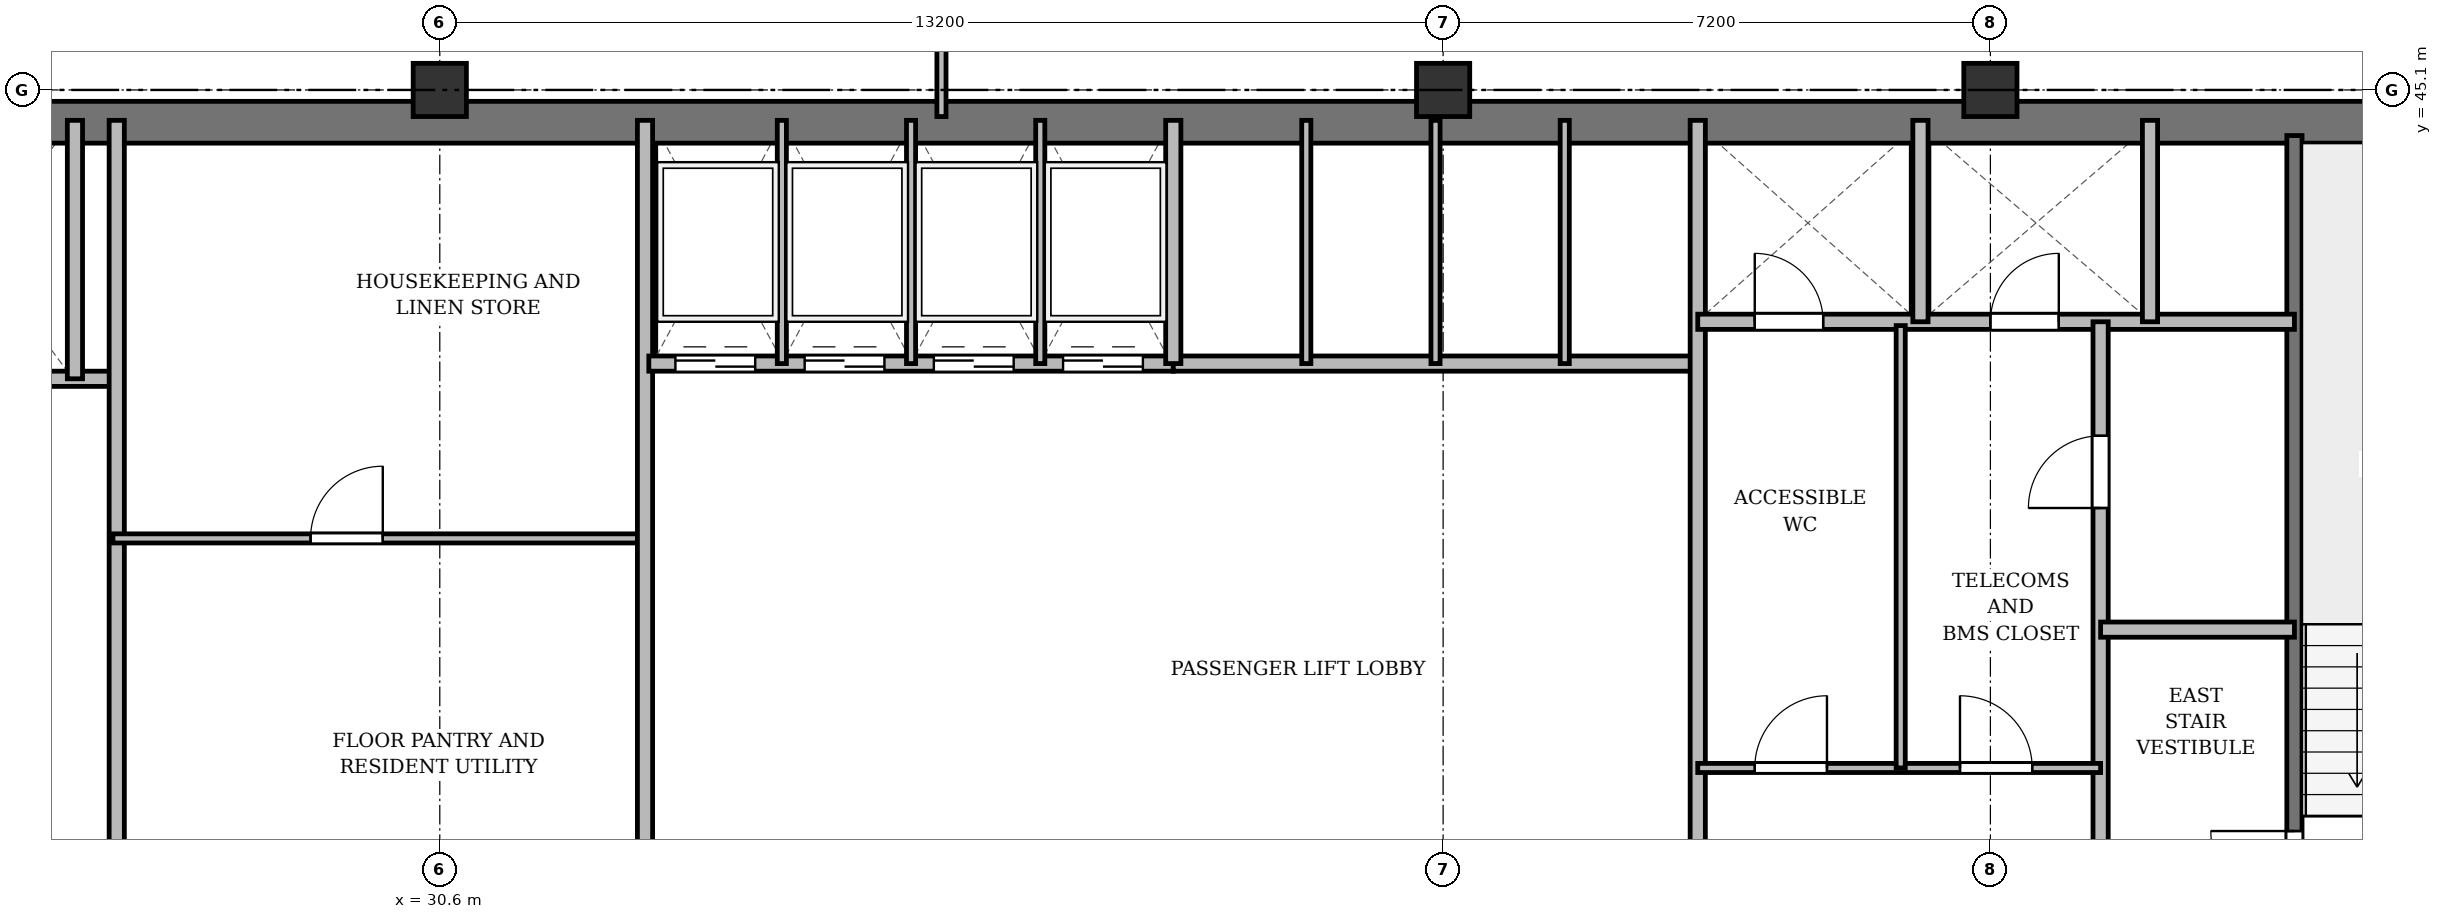
"""IFC4 building model, lengths in metres.
Left out: names, types, materials, properties, quantities, classifications, styles, units other than length and angle.
Written with IfcOpenShell. Run it as: python <this file> out.ifc"""

import sys

from ifc_helpers import new_model, si_unit, direction, frame, frame_2d, origin, origin_2d, place, context, subcontext, project, spatial, rectangle, extrude, source, transform, mapped, element, fill, save


model = new_model("IFC4")
c1 = context("Model", 3, precision=1e-05, world=origin(), true_north=direction((0.0, 1.0)))
c2 = subcontext(c1, "Body", "Model", "MODEL_VIEW")
j1 = project(units=[si_unit("LENGTHUNIT", "METRE"), si_unit("PLANEANGLEUNIT", "RADIAN")], contexts=[c1])
p1 = place(None, origin())
s1 = spatial("IfcSite", under=j1, at=p1, CompositionType="ELEMENT")
p2 = place(p1, origin())
s2 = spatial("IfcBuilding", under=s1, at=p2, CompositionType="ELEMENT")
p3 = place(p2, frame((0.0, 0.0, 142.9)))
s3 = spatial("IfcBuildingStorey", under=s2, at=p3, CompositionType="ELEMENT", Elevation=142.9)
m1 = source(origin(), c2, "Body", "SweptSolid", [
    extrude(rectangle(XDim=0.7, YDim=0.7, at=origin_2d()), origin(), (0.0, 0.0, 1.0), 3.6),
])
for number, where, z_axis, x_axis in (
    (1, (30.6, 45.1, 0.0), (0.0, 0.0, 1.0), (1.0, 0.0, 0.0)),
    (2, (43.8, 45.1, 0.0), (0.0, 0.0, 1.0), (1.0, 0.0, 0.0)),
    (3, (51.0, 45.1, 0.0), (0.0, 0.0, 1.0), (1.0, 0.0, 0.0)),
):
    element("IfcColumn", number, at=place(p3, frame(where, z_axis=z_axis, x_axis=x_axis)), inside=s3, PredefinedType="COLUMN", context=c2, shape_type="MappedRepresentation", body=[
        mapped(m1, transform((0.0, 0.0, 0.0), x_axis=(1.0, 0.0, 0.0), y_axis=(0.0, 1.0, 0.0), z_axis=(0.0, 0.0, 1.0), scale=1.0)),
    ])
p4 = place(p3, frame((15.65, 44.675, 0.0), z_axis=(0.0, 0.0, 1.0), x_axis=(1.0, 0.0, 0.0)))
e4 = element("IfcWall", 4, at=p4, inside=s3, PredefinedType="SHEAR", context=c2, shape_type="SweptSolid", body=[
    extrude(rectangle(XDim=43.1, YDim=0.55, at=frame_2d((21.55, 0.0))), origin(), (0.0, 0.0, 1.0), 3.35),
])
p5 = place(p3, frame((55.0, 33.4, 0.0), z_axis=(0.0, 0.0, 1.0), x_axis=(0.0, 1.0, 0.0)))
e5 = element("IfcWall", 5, at=p5, inside=s3, PredefinedType="SHEAR", context=c2, shape_type="SweptSolid", body=[
    extrude(rectangle(XDim=11.1, YDim=0.2, at=frame_2d((5.55, 0.0))), origin(), (0.0, 0.0, 1.0), 3.35),
])
p6 = place(p5, frame((0.85, 0.0, 0.0)))
e6 = element("IfcOpeningElement", 6, at=p6, cuts=e5, PredefinedType="OPENING", context=c2, shape_type="SweptSolid", body=[
    extrude(rectangle(XDim=1.1, YDim=2.15, at=frame_2d((0.55, 1.075))), frame((0.0, 0.11, 0.0), z_axis=(0.0, -1.0, 0.0), x_axis=(1.0, 0.0, 0.0)), (0.0, 0.0, 1.0), 0.22),
])
p7 = place(p3, frame((19.55, 41.3, 0.0), z_axis=(0.0, 0.0, 1.0), x_axis=(1.0, 0.0, 0.0)))
e7 = element("IfcWall", 7, at=p7, inside=s3, PredefinedType="SOLIDWALL", context=c2, shape_type="SweptSolid", body=[
    extrude(rectangle(XDim=6.75, YDim=0.2, at=frame_2d((3.375, 0.0))), origin(), (0.0, 0.0, 1.0), 3.35),
])
p8 = place(p7, frame((1.7, 0.0, 0.0)))
e8 = element("IfcOpeningElement", 8, at=p8, cuts=e7, PredefinedType="OPENING", context=c2, shape_type="SweptSolid", body=[
    extrude(rectangle(XDim=1.1, YDim=2.15, at=frame_2d((0.55, 1.075))), frame((0.0, 0.11, 0.0), z_axis=(0.0, -1.0, 0.0), x_axis=(1.0, 0.0, 0.0)), (0.0, 0.0, 1.0), 0.22),
])
p9 = place(p7, frame((4.4, 0.0, 0.0)))
e9 = element("IfcOpeningElement", 9, at=p9, cuts=e7, PredefinedType="OPENING", context=c2, shape_type="SweptSolid", body=[
    extrude(rectangle(XDim=1.1, YDim=2.15, at=frame_2d((0.55, 1.075))), frame((0.0, 0.11, 0.0), z_axis=(0.0, -1.0, 0.0), x_axis=(1.0, 0.0, 0.0)), (0.0, 0.0, 1.0), 0.22),
])
p10 = place(p3, frame((25.8, 41.3, 0.0), z_axis=(0.0, 0.0, 1.0), x_axis=(0.0, 1.0, 0.0)))
e10 = element("IfcWall", 10, at=p10, inside=s3, PredefinedType="SOLIDWALL", context=c2, shape_type="SweptSolid", body=[
    extrude(rectangle(XDim=3.4, YDim=0.2, at=frame_2d((1.7, 0.0))), origin(), (0.0, 0.0, 1.0), 3.35),
])
p11 = place(p3, frame((26.35, 33.4, 0.0), z_axis=(0.0, 0.0, 1.0), x_axis=(0.0, 1.0, 0.0)))
e11 = element("IfcWall", 11, at=p11, inside=s3, PredefinedType="SOLIDWALL", context=c2, shape_type="SweptSolid", body=[
    extrude(rectangle(XDim=11.3, YDim=0.2, at=frame_2d((5.65, 0.0))), origin(), (0.0, 0.0, 1.0), 2.75),
])
p12 = place(p3, frame((26.3, 39.2, 0.0), z_axis=(0.0, 0.0, 1.0), x_axis=(1.0, 0.0, 0.0)))
e12 = element("IfcWall", 12, at=p12, inside=s3, PredefinedType="PARTITIONING", context=c2, shape_type="SweptSolid", body=[
    extrude(rectangle(XDim=7.0, YDim=0.12, at=frame_2d((3.5, 0.0))), origin(), (0.0, 0.0, 1.0), 2.85),
])
p13 = place(p12, frame((2.6, 0.0, 0.0)))
e13 = element("IfcOpeningElement", 13, at=p13, cuts=e12, PredefinedType="OPENING", context=c2, shape_type="SweptSolid", body=[
    extrude(rectangle(XDim=0.95, YDim=2.15, at=frame_2d((0.475, 1.075))), frame((0.0, 0.07, 0.0), z_axis=(0.0, -1.0, 0.0), x_axis=(1.0, 0.0, 0.0)), (0.0, 0.0, 1.0), 0.14),
])
p14 = place(p3, frame((33.3, 33.4, 0.0), z_axis=(0.0, 0.0, 1.0), x_axis=(0.0, 1.0, 0.0)))
e14 = element("IfcWall", 14, at=p14, inside=s3, PredefinedType="SOLIDWALL", context=c2, shape_type="SweptSolid", body=[
    extrude(rectangle(XDim=11.3, YDim=0.2, at=frame_2d((5.65, 0.0))), origin(), (0.0, 0.0, 1.0), 2.75),
])
p15 = place(p3, frame((33.35, 41.5, 0.0), z_axis=(0.0, 0.0, 1.0), x_axis=(1.0, 0.0, 0.0)))
e15 = element("IfcWall", 15, at=p15, inside=s3, PredefinedType="SOLIDWALL", context=c2, shape_type="SweptSolid", body=[
    extrude(rectangle(XDim=6.9, YDim=0.2, at=frame_2d((3.45, 0.0))), origin(), (0.0, 0.0, 1.0), 3.35),
])
p16 = place(p15, frame((0.35, 0.0, 0.0)))
e16 = element("IfcOpeningElement", 16, at=p16, cuts=e15, PredefinedType="OPENING", context=c2, shape_type="SweptSolid", body=[
    extrude(rectangle(XDim=1.05, YDim=2.15, at=frame_2d((0.525, 1.075))), frame((0.0, 0.11, 0.0), z_axis=(0.0, -1.0, 0.0), x_axis=(1.0, 0.0, 0.0)), (0.0, 0.0, 1.0), 0.22),
])
p17 = place(p15, frame((2.05, 0.0, 0.0)))
e17 = element("IfcOpeningElement", 17, at=p17, cuts=e15, PredefinedType="OPENING", context=c2, shape_type="SweptSolid", body=[
    extrude(rectangle(XDim=1.05, YDim=2.15, at=frame_2d((0.525, 1.075))), frame((0.0, 0.11, 0.0), z_axis=(0.0, -1.0, 0.0), x_axis=(1.0, 0.0, 0.0)), (0.0, 0.0, 1.0), 0.22),
])
p18 = place(p15, frame((3.75, 0.0, 0.0)))
e18 = element("IfcOpeningElement", 18, at=p18, cuts=e15, PredefinedType="OPENING", context=c2, shape_type="SweptSolid", body=[
    extrude(rectangle(XDim=1.05, YDim=2.15, at=frame_2d((0.525, 1.075))), frame((0.0, 0.11, 0.0), z_axis=(0.0, -1.0, 0.0), x_axis=(1.0, 0.0, 0.0)), (0.0, 0.0, 1.0), 0.22),
])
p19 = place(p15, frame((5.45, 0.0, 0.0)))
e19 = element("IfcOpeningElement", 19, at=p19, cuts=e15, PredefinedType="OPENING", context=c2, shape_type="SweptSolid", body=[
    extrude(rectangle(XDim=1.05, YDim=2.15, at=frame_2d((0.525, 1.075))), frame((0.0, 0.11, 0.0), z_axis=(0.0, -1.0, 0.0), x_axis=(1.0, 0.0, 0.0)), (0.0, 0.0, 1.0), 0.22),
])
for number, where, z_axis, x_axis in (
    (20, (35.1, 41.5, 0.0), (0.0, 0.0, 1.0), (0.0, 1.0, 0.0)),
    (21, (36.8, 41.5, 0.0), (0.0, 0.0, 1.0), (0.0, 1.0, 0.0)),
    (22, (38.5, 41.5, 0.0), (0.0, 0.0, 1.0), (0.0, 1.0, 0.0)),
):
    element("IfcWall", number, at=place(p3, frame(where, z_axis=z_axis, x_axis=x_axis)), inside=s3, PredefinedType="PARTITIONING", context=c2, shape_type="SweptSolid", body=[
        extrude(rectangle(XDim=3.2, YDim=0.12, at=frame_2d((1.6, 0.0))), origin(), (0.0, 0.0, 1.0), 3.35),
    ])
p20 = place(p3, frame((40.25, 41.5, 0.0), z_axis=(0.0, 0.0, 1.0), x_axis=(1.0, 0.0, 0.0)))
e23 = element("IfcWall", 23, at=p20, inside=s3, PredefinedType="SOLIDWALL", context=c2, shape_type="SweptSolid", body=[
    extrude(rectangle(XDim=6.9, YDim=0.2, at=frame_2d((3.45, 0.0))), origin(), (0.0, 0.0, 1.0), 2.85),
])
p21 = place(p3, frame((40.25, 41.5, 0.0), z_axis=(0.0, 0.0, 1.0), x_axis=(0.0, 1.0, 0.0)))
e24 = element("IfcWall", 24, at=p21, inside=s3, PredefinedType="SOLIDWALL", context=c2, shape_type="SweptSolid", body=[
    extrude(rectangle(XDim=3.2, YDim=0.2, at=frame_2d((1.6, 0.0))), origin(), (0.0, 0.0, 1.0), 3.35),
])
p22 = place(p3, frame((42.0, 41.5, 0.0), z_axis=(0.0, 0.0, 1.0), x_axis=(0.0, 1.0, 0.0)))
e25 = element("IfcWall", 25, at=p22, inside=s3, PredefinedType="PARTITIONING", context=c2, shape_type="SweptSolid", body=[
    extrude(rectangle(XDim=3.2, YDim=0.12, at=frame_2d((1.6, 0.0))), origin(), (0.0, 0.0, 1.0), 3.35),
])
p23 = place(p3, frame((43.7, 41.5, 0.0), z_axis=(0.0, 0.0, 1.0), x_axis=(0.0, 1.0, 0.0)))
e26 = element("IfcWall", 26, at=p23, inside=s3, PredefinedType="PARTITIONING", context=c2, shape_type="SweptSolid", body=[
    extrude(rectangle(XDim=3.2, YDim=0.12, at=frame_2d((1.6, 0.0))), origin(), (0.0, 0.0, 1.0), 2.85),
])
p24 = place(p3, frame((45.4, 41.5, 0.0), z_axis=(0.0, 0.0, 1.0), x_axis=(0.0, 1.0, 0.0)))
e27 = element("IfcWall", 27, at=p24, inside=s3, PredefinedType="PARTITIONING", context=c2, shape_type="SweptSolid", body=[
    extrude(rectangle(XDim=3.2, YDim=0.12, at=frame_2d((1.6, 0.0))), origin(), (0.0, 0.0, 1.0), 3.35),
])
p25 = place(p3, frame((47.15, 33.4, 0.0), z_axis=(0.0, 0.0, 1.0), x_axis=(0.0, 1.0, 0.0)))
e28 = element("IfcWall", 28, at=p25, inside=s3, PredefinedType="SOLIDWALL", context=c2, shape_type="SweptSolid", body=[
    extrude(rectangle(XDim=11.3, YDim=0.2, at=frame_2d((5.65, 0.0))), origin(), (0.0, 0.0, 1.0), 2.75),
])
p26 = place(p3, frame((47.15, 42.05, 0.0), z_axis=(0.0, 0.0, 1.0), x_axis=(1.0, 0.0, 0.0)))
e29 = element("IfcWall", 29, at=p26, inside=s3, PredefinedType="SOLIDWALL", context=c2, shape_type="SweptSolid", body=[
    extrude(rectangle(XDim=7.85, YDim=0.2, at=frame_2d((3.925, 0.0))), origin(), (0.0, 0.0, 1.0), 2.85),
])
p27 = place(p26, frame((0.75, 0.0, 0.0)))
e30 = element("IfcOpeningElement", 30, at=p27, cuts=e29, PredefinedType="OPENING", context=c2, shape_type="SweptSolid", body=[
    extrude(rectangle(XDim=0.9, YDim=2.1, at=frame_2d((0.45, 1.05))), frame((0.0, 0.11, 0.0), z_axis=(0.0, -1.0, 0.0), x_axis=(1.0, 0.0, 0.0)), (0.0, 0.0, 1.0), 0.22),
])
p28 = place(p26, frame((3.85, 0.0, 0.0)))
e31 = element("IfcOpeningElement", 31, at=p28, cuts=e29, PredefinedType="OPENING", context=c2, shape_type="SweptSolid", body=[
    extrude(rectangle(XDim=0.9, YDim=2.1, at=frame_2d((0.45, 1.05))), frame((0.0, 0.11, 0.0), z_axis=(0.0, -1.0, 0.0), x_axis=(1.0, 0.0, 0.0)), (0.0, 0.0, 1.0), 0.22),
])
for number, where, z_axis, x_axis in (
    (32, (50.08, 42.05, 0.0), (0.0, 0.0, 1.0), (0.0, 1.0, 0.0)),
    (33, (53.1, 42.05, 0.0), (0.0, 0.0, 1.0), (0.0, 1.0, 0.0)),
):
    element("IfcWall", number, at=place(p3, frame(where, z_axis=z_axis, x_axis=x_axis)), inside=s3, PredefinedType="SOLIDWALL", context=c2, shape_type="SweptSolid", body=[
        extrude(rectangle(XDim=2.65, YDim=0.2, at=frame_2d((1.325, 0.0))), origin(), (0.0, 0.0, 1.0), 3.35),
    ])
p29 = place(p3, frame((52.45, 33.4, 0.0), z_axis=(0.0, 0.0, 1.0), x_axis=(0.0, 1.0, 0.0)))
e34 = element("IfcWall", 34, at=p29, inside=s3, PredefinedType="PARTITIONING", context=c2, shape_type="SweptSolid", body=[
    extrude(rectangle(XDim=8.65, YDim=0.2, at=frame_2d((4.325, 0.0))), origin(), (0.0, 0.0, 1.0), 2.75),
])
p30 = place(p29, frame((6.2, 0.0, 0.0)))
e35 = element("IfcOpeningElement", 35, at=p30, cuts=e34, PredefinedType="OPENING", context=c2, shape_type="SweptSolid", body=[
    extrude(rectangle(XDim=0.95, YDim=2.15, at=frame_2d((0.475, 1.075))), frame((0.0, 0.11, 0.0), z_axis=(0.0, -1.0, 0.0), x_axis=(1.0, 0.0, 0.0)), (0.0, 0.0, 1.0), 0.22),
])
p31 = place(p3, frame((52.45, 38.0, 0.0), z_axis=(0.0, 0.0, 1.0), x_axis=(1.0, 0.0, 0.0)))
e36 = element("IfcWall", 36, at=p31, inside=s3, PredefinedType="PARTITIONING", context=c2, shape_type="SweptSolid", body=[
    extrude(rectangle(XDim=2.55, YDim=0.2, at=frame_2d((1.275, 0.0))), origin(), (0.0, 0.0, 1.0), 3.35),
])
p32 = place(p3, frame((47.15, 36.18, 0.0), z_axis=(0.0, 0.0, 1.0), x_axis=(1.0, 0.0, 0.0)))
e37 = element("IfcWall", 37, at=p32, inside=s3, PredefinedType="PARTITIONING", context=c2, shape_type="SweptSolid", body=[
    extrude(rectangle(XDim=5.3, YDim=0.12, at=frame_2d((2.65, 0.0))), origin(), (0.0, 0.0, 1.0), 2.85),
])
p33 = place(p32, frame((0.75, 0.0, 0.0)))
e38 = element("IfcOpeningElement", 38, at=p33, cuts=e37, PredefinedType="OPENING", context=c2, shape_type="SweptSolid", body=[
    extrude(rectangle(XDim=0.95, YDim=2.15, at=frame_2d((0.475, 1.075))), frame((0.0, 0.07, 0.0), z_axis=(0.0, -1.0, 0.0), x_axis=(1.0, 0.0, 0.0)), (0.0, 0.0, 1.0), 0.14),
])
p34 = place(p32, frame((3.45, 0.0, 0.0)))
e39 = element("IfcOpeningElement", 39, at=p34, cuts=e37, PredefinedType="OPENING", context=c2, shape_type="SweptSolid", body=[
    extrude(rectangle(XDim=0.95, YDim=2.15, at=frame_2d((0.475, 1.075))), frame((0.0, 0.07, 0.0), z_axis=(0.0, -1.0, 0.0), x_axis=(1.0, 0.0, 0.0)), (0.0, 0.0, 1.0), 0.14),
])
p35 = place(p3, frame((49.82, 36.18, 0.0), z_axis=(0.0, 0.0, 1.0), x_axis=(0.0, 1.0, 0.0)))
e40 = element("IfcWall", 40, at=p35, inside=s3, PredefinedType="PARTITIONING", context=c2, shape_type="SweptSolid", body=[
    extrude(rectangle(XDim=5.82, YDim=0.12, at=frame_2d((2.91, 0.0))), origin(), (0.0, 0.0, 1.0), 3.35),
])
p36 = place(p3, frame((37.2, 44.75, 0.0), z_axis=(0.0, 0.0, 1.0), x_axis=(0.0, 1.0, 0.0)))
e41 = element("IfcWall", 41, at=p36, inside=s3, PredefinedType="PARTITIONING", context=c2, shape_type="SweptSolid", body=[
    extrude(rectangle(XDim=3.61, YDim=0.12, at=frame_2d((1.805, 0.0))), origin(), (0.0, 0.0, 1.0), 2.75),
])
p37 = place(p36, frame((1.1, 0.0, 0.0)))
e42 = element("IfcOpeningElement", 42, at=p37, cuts=e41, PredefinedType="OPENING", context=c2, shape_type="SweptSolid", body=[
    extrude(rectangle(XDim=0.95, YDim=2.15, at=frame_2d((0.475, 1.075))), frame((0.0, 0.07, 0.0), z_axis=(0.0, -1.0, 0.0), x_axis=(1.0, 0.0, 0.0)), (0.0, 0.0, 1.0), 0.14),
])
m2 = source(origin(), c2, "Body", "SweptSolid", [
    extrude(rectangle(XDim=1.1, YDim=2.15, at=frame_2d((0.55, 1.075))), frame((0.0, 0.025, 0.0), z_axis=(0.0, -1.0, 0.0), x_axis=(1.0, 0.0, 0.0)), (0.0, 0.0, 1.0), 0.05),
])
p38 = place(p6, origin())
e43 = element("IfcDoor", 43, at=p38, inside=s3, OperationType="SINGLE_SWING_RIGHT", PredefinedType="DOOR", context=c2, shape_type="MappedRepresentation", body=[
    mapped(m2, transform((0.0, 0.0, 0.0), x_axis=(1.0, 0.0, 0.0), y_axis=(0.0, 1.0, 0.0), z_axis=(0.0, 0.0, 1.0), scale=1.0)),
])
fill(e6, e43)
m3 = source(origin(), c2, "Body", "SweptSolid", [
    extrude(rectangle(XDim=0.95, YDim=2.15, at=frame_2d((0.475, 1.075))), frame((0.0, 0.025, 0.0), z_axis=(0.0, -1.0, 0.0), x_axis=(1.0, 0.0, 0.0)), (0.0, 0.0, 1.0), 0.05),
])
p39 = place(p13, origin())
e44 = element("IfcDoor", 44, at=p39, inside=s3, OperationType="SINGLE_SWING_RIGHT", PredefinedType="DOOR", context=c2, shape_type="MappedRepresentation", body=[
    mapped(m3, transform((0.0, 0.0, 0.0), x_axis=(1.0, 0.0, 0.0), y_axis=(0.0, 1.0, 0.0), z_axis=(0.0, 0.0, 1.0), scale=1.0)),
])
fill(e13, e44)
m4 = source(origin(), c2, "Body", "SweptSolid", [
    extrude(rectangle(XDim=1.05, YDim=2.15, at=frame_2d((0.525, 1.075))), frame((0.0, 0.025, 0.0), z_axis=(0.0, -1.0, 0.0), x_axis=(1.0, 0.0, 0.0)), (0.0, 0.0, 1.0), 0.05),
])
p40 = place(p16, origin())
e45 = element("IfcDoor", 45, at=p40, inside=s3, OperationType="DOUBLE_DOOR_SLIDING", PredefinedType="DOOR", context=c2, shape_type="MappedRepresentation", body=[
    mapped(m4, transform((0.0, 0.0, 0.0), x_axis=(1.0, 0.0, 0.0), y_axis=(0.0, 1.0, 0.0), z_axis=(0.0, 0.0, 1.0), scale=1.0)),
])
fill(e16, e45)
p41 = place(p17, origin())
e46 = element("IfcDoor", 46, at=p41, inside=s3, OperationType="DOUBLE_DOOR_SLIDING", PredefinedType="DOOR", context=c2, shape_type="MappedRepresentation", body=[
    mapped(m4, transform((0.0, 0.0, 0.0), x_axis=(1.0, 0.0, 0.0), y_axis=(0.0, 1.0, 0.0), z_axis=(0.0, 0.0, 1.0), scale=1.0)),
])
fill(e17, e46)
p42 = place(p18, origin())
e47 = element("IfcDoor", 47, at=p42, inside=s3, OperationType="DOUBLE_DOOR_SLIDING", PredefinedType="DOOR", context=c2, shape_type="MappedRepresentation", body=[
    mapped(m4, transform((0.0, 0.0, 0.0), x_axis=(1.0, 0.0, 0.0), y_axis=(0.0, 1.0, 0.0), z_axis=(0.0, 0.0, 1.0), scale=1.0)),
])
fill(e18, e47)
p43 = place(p19, origin())
e48 = element("IfcDoor", 48, at=p43, inside=s3, OperationType="DOUBLE_DOOR_SLIDING", PredefinedType="DOOR", context=c2, shape_type="MappedRepresentation", body=[
    mapped(m4, transform((0.0, 0.0, 0.0), x_axis=(1.0, 0.0, 0.0), y_axis=(0.0, 1.0, 0.0), z_axis=(0.0, 0.0, 1.0), scale=1.0)),
])
fill(e19, e48)
m5 = source(origin(), c2, "Body", "SweptSolid", [
    extrude(rectangle(XDim=0.9, YDim=2.1, at=frame_2d((0.45, 1.05))), frame((0.0, 0.025, 0.0), z_axis=(0.0, -1.0, 0.0), x_axis=(1.0, 0.0, 0.0)), (0.0, 0.0, 1.0), 0.05),
])
p44 = place(p27, origin())
e49 = element("IfcDoor", 49, at=p44, inside=s3, OperationType="SINGLE_SWING_LEFT", PredefinedType="DOOR", context=c2, shape_type="MappedRepresentation", body=[
    mapped(m5, transform((0.0, 0.0, 0.0), x_axis=(1.0, 0.0, 0.0), y_axis=(0.0, 1.0, 0.0), z_axis=(0.0, 0.0, 1.0), scale=1.0)),
])
fill(e30, e49)
p45 = place(p28, origin())
e50 = element("IfcDoor", 50, at=p45, inside=s3, OperationType="SINGLE_SWING_RIGHT", PredefinedType="DOOR", context=c2, shape_type="MappedRepresentation", body=[
    mapped(m5, transform((0.0, 0.0, 0.0), x_axis=(1.0, 0.0, 0.0), y_axis=(0.0, 1.0, 0.0), z_axis=(0.0, 0.0, 1.0), scale=1.0)),
])
fill(e31, e50)
p46 = place(p30, origin())
e51 = element("IfcDoor", 51, at=p46, inside=s3, OperationType="SINGLE_SWING_LEFT", PredefinedType="DOOR", context=c2, shape_type="MappedRepresentation", body=[
    mapped(m3, transform((0.0, 0.0, 0.0), x_axis=(1.0, 0.0, 0.0), y_axis=(0.0, 1.0, 0.0), z_axis=(0.0, 0.0, 1.0), scale=1.0)),
])
fill(e35, e51)
p47 = place(p33, origin())
e52 = element("IfcDoor", 52, at=p47, inside=s3, OperationType="SINGLE_SWING_RIGHT", PredefinedType="DOOR", context=c2, shape_type="MappedRepresentation", body=[
    mapped(m3, transform((0.0, 0.0, 0.0), x_axis=(1.0, 0.0, 0.0), y_axis=(0.0, 1.0, 0.0), z_axis=(0.0, 0.0, 1.0), scale=1.0)),
])
fill(e38, e52)
p48 = place(p34, origin())
e53 = element("IfcDoor", 53, at=p48, inside=s3, OperationType="SINGLE_SWING_LEFT", PredefinedType="DOOR", context=c2, shape_type="MappedRepresentation", body=[
    mapped(m3, transform((0.0, 0.0, 0.0), x_axis=(1.0, 0.0, 0.0), y_axis=(0.0, 1.0, 0.0), z_axis=(0.0, 0.0, 1.0), scale=1.0)),
])
fill(e39, e53)
save(model, sys.argv[1])
